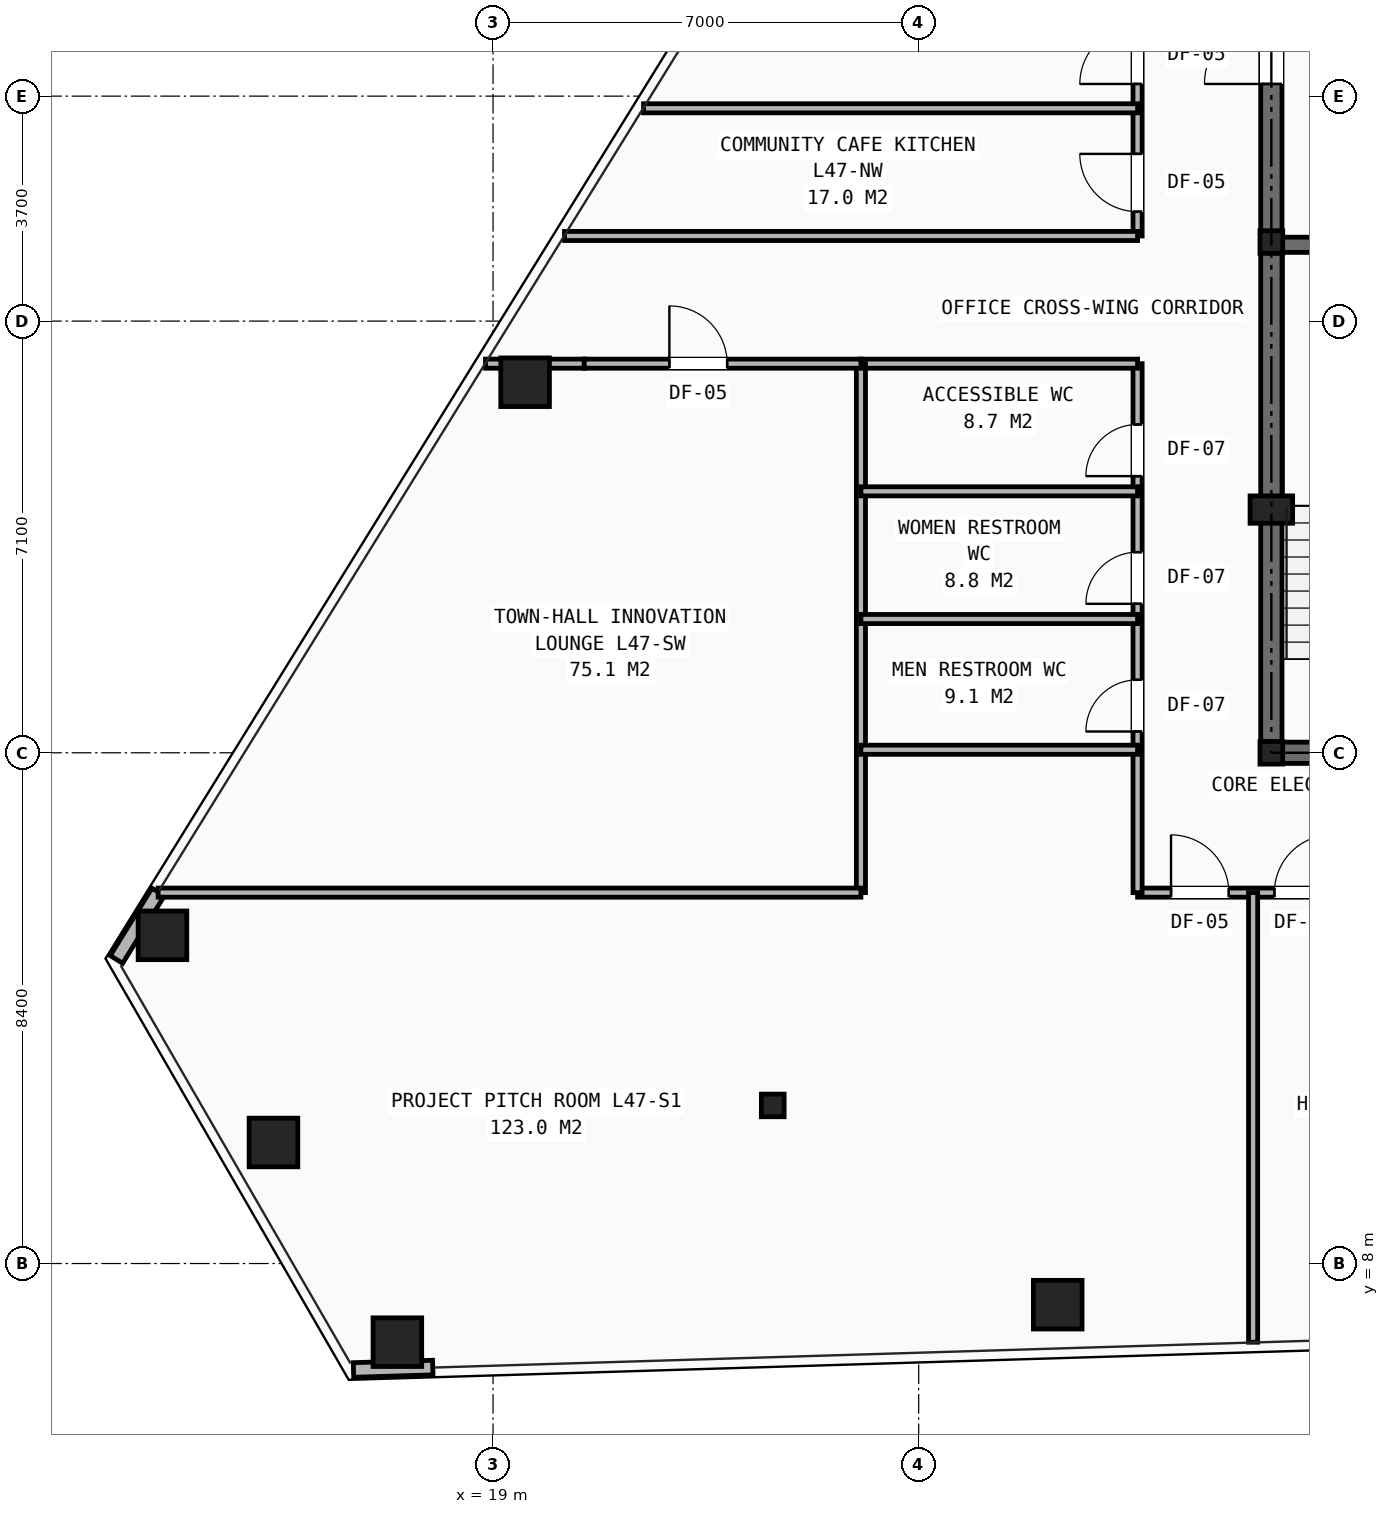
"""IFC4 building model, lengths in metres.
Left out: names, types, materials, properties, quantities, classifications, styles, units other than length and angle.
Written with IfcOpenShell. Run it as: python <this file> out.ifc"""

import sys

from ifc_helpers import new_model, si_unit, direction, frame, frame_2d, origin, origin_2d, place, context, subcontext, project, spatial, rectangle, hollow_rectangle, i_section, extrude, element, fill, save


model = new_model("IFC4")
c1 = context("Model", 3, precision=1e-05, world=origin(), true_north=direction((0.0, 1.0)))
c2 = subcontext(c1, "Body", "Model", "MODEL_VIEW")
j1 = project(units=[si_unit("LENGTHUNIT", "METRE"), si_unit("PLANEANGLEUNIT", "RADIAN")], contexts=[c1])
p1 = place(None, origin())
s1 = spatial("IfcSite", under=j1, at=p1, CompositionType="ELEMENT")
p2 = place(p1, origin())
s2 = spatial("IfcBuilding", under=s1, at=p2, CompositionType="ELEMENT")
p3 = place(p2, frame((0.0, 0.0, 165.45)))
s3 = spatial("IfcBuildingStorey", under=s2, at=p3, CompositionType="ELEMENT", Elevation=165.45)
for number, where, z_axis, x_axis in (
    (1, (31.8, 16.4, 0.0), (0.0, 0.0, 1.0), (1.0, 0.0, 0.0)),
    (2, (31.8, 24.8, 0.0), (0.0, 0.0, 1.0), (1.0, 0.0, 0.0)),
    (3, (23.6, 10.6, 0.0), (0.0, 0.0, 1.0), (1.0, 0.0, 0.0)),
):
    element("IfcColumn", number, at=place(p3, frame(where, z_axis=z_axis, x_axis=x_axis)), inside=s3, PredefinedType="COLUMN", context=c2, shape_type="SweptSolid", body=[
        extrude(i_section(OverallWidth=0.374, OverallDepth=0.372, WebThickness=0.016, FlangeThickness=0.026, at=origin_2d()), origin(), (0.0, 0.0, 1.0), 3.45),
    ])
p4 = place(p3, frame((31.8, 20.4, 0.0), z_axis=(0.0, 0.0, 1.0), x_axis=(1.0, 0.0, 0.0)))
e4 = element("IfcColumn", 4, at=p4, inside=s3, PredefinedType="PILASTER", context=c2, shape_type="SweptSolid", body=[
    extrude(rectangle(XDim=0.7, YDim=0.45, at=origin_2d()), origin(), (0.0, 0.0, 1.0), 3.45),
])
for number, where, z_axis, x_axis in (
    (5, (19.527, 22.494, 0.0), (0.0, 0.0, 1.0), (1.0, 0.0, 0.0)),
    (6, (13.564, 13.398, 0.0), (0.0, 0.0, 1.0), (1.0, 0.0, 0.0)),
    (7, (15.389, 9.991, 0.0), (0.0, 0.0, 1.0), (1.0, 0.0, 0.0)),
    (8, (17.427, 6.707, 0.0), (0.0, 0.0, 1.0), (1.0, 0.0, 0.0)),
    (9, (28.287, 7.323, 0.0), (0.0, 0.0, 1.0), (1.0, 0.0, 0.0)),
):
    element("IfcColumn", number, at=place(p3, frame(where, z_axis=z_axis, x_axis=x_axis)), inside=s3, PredefinedType="COLUMN", context=c2, shape_type="SweptSolid", body=[
        extrude(hollow_rectangle(XDim=0.8, YDim=0.8, WallThickness=0.055, at=origin_2d()), origin(), (0.0, 0.0, 1.0), 3.45),
    ])
p5 = place(p3, frame((13.493, 14.111, 0.0), z_axis=(0.0, 0.0, 1.0), x_axis=(-0.526225760999, -0.850344899709, 0.0)))
e10 = element("IfcWall", 10, at=p5, inside=s3, PredefinedType="SHEAR", context=c2, shape_type="SweptSolid", body=[
    extrude(rectangle(XDim=1.305, YDim=0.24, at=frame_2d((0.652, 0.0))), origin(), (0.0, 0.0, 1.0), 2.583),
])
p6 = place(p3, frame((16.705, 6.249, 0.0), z_axis=(0.0, 0.0, 1.0), x_axis=(0.999534631681, 0.030504427067, 0.0)))
e11 = element("IfcWall", 11, at=p6, inside=s3, PredefinedType="SHEAR", context=c2, shape_type="SweptSolid", body=[
    extrude(rectangle(XDim=1.304, YDim=0.24, at=frame_2d((0.652, 0.0))), origin(), (0.0, 0.0, 1.0), 2.583),
])
p7 = place(p3, frame((31.8, 16.4, 0.0), z_axis=(0.0, 0.0, 1.0), x_axis=(1.0, 0.0, 0.0)))
e12 = element("IfcWall", 12, at=p7, inside=s3, PredefinedType="SHEAR", context=c2, shape_type="SweptSolid", body=[
    extrude(rectangle(XDim=16.4, YDim=0.35, at=frame_2d((8.2, 0.0))), origin(), (0.0, 0.0, 1.0), 3.21),
])
p8 = place(p7, frame((4.2, 0.0, 0.0)))
e13 = element("IfcOpeningElement", 13, at=p8, cuts=e12, PredefinedType="OPENING", context=c2, shape_type="SweptSolid", body=[
    extrude(rectangle(XDim=0.95, YDim=2.1, at=frame_2d((0.475, 1.05))), frame((0.0, 0.185, 0.0), z_axis=(0.0, -1.0, 0.0), x_axis=(1.0, 0.0, 0.0)), (0.0, 0.0, 1.0), 0.37),
])
p9 = place(p7, frame((10.6, 0.0, 0.0)))
e14 = element("IfcOpeningElement", 14, at=p9, cuts=e12, PredefinedType="OPENING", context=c2, shape_type="SweptSolid", body=[
    extrude(rectangle(XDim=0.95, YDim=2.1, at=frame_2d((0.475, 1.05))), frame((0.0, 0.185, 0.0), z_axis=(0.0, -1.0, 0.0), x_axis=(1.0, 0.0, 0.0)), (0.0, 0.0, 1.0), 0.37),
])
p10 = place(p3, frame((31.8, 16.4, 0.0), z_axis=(0.0, 0.0, 1.0), x_axis=(0.0, 1.0, 0.0)))
e15 = element("IfcWall", 15, at=p10, inside=s3, PredefinedType="SHEAR", context=c2, shape_type="SweptSolid", body=[
    extrude(rectangle(XDim=14.8, YDim=0.35, at=frame_2d((7.4, 0.0))), origin(), (0.0, 0.0, 1.0), 3.21),
])
p11 = place(p10, frame((11.0, 0.0, 0.0)))
e16 = element("IfcOpeningElement", 16, at=p11, cuts=e15, PredefinedType="OPENING", context=c2, shape_type="SweptSolid", body=[
    extrude(rectangle(XDim=1.1, YDim=2.15, at=frame_2d((0.55, 1.075))), frame((0.0, 0.185, 0.0), z_axis=(0.0, -1.0, 0.0), x_axis=(1.0, 0.0, 0.0)), (0.0, 0.0, 1.0), 0.37),
])
p12 = place(p3, frame((31.8, 24.755, 0.0), z_axis=(0.0, 0.0, 1.0), x_axis=(1.0, 0.0, 0.0)))
e17 = element("IfcWall", 17, at=p12, inside=s3, PredefinedType="SHEAR", context=c2, shape_type="SweptSolid", body=[
    extrude(rectangle(XDim=3.245, YDim=0.25, at=frame_2d((1.623, 0.0))), origin(), (0.0, 0.0, 1.0), 3.21),
])
p13 = place(p3, frame((29.6, 14.1, 0.0), z_axis=(0.0, 0.0, 1.0), x_axis=(1.0, 0.0, 0.0)))
e18 = element("IfcWall", 18, at=p13, inside=s3, PredefinedType="PARTITIONING", context=c2, shape_type="SweptSolid", body=[
    extrude(rectangle(XDim=18.6, YDim=0.15, at=frame_2d((9.3, 0.0))), origin(), (0.0, 0.0, 1.0), 2.252),
])
p14 = place(p13, frame((0.55, 0.0, 0.0)))
e19 = element("IfcOpeningElement", 19, at=p14, cuts=e18, PredefinedType="OPENING", context=c2, shape_type="SweptSolid", body=[
    extrude(rectangle(XDim=0.95, YDim=2.1, at=frame_2d((0.475, 1.05))), frame((0.0, 0.085, 0.0), z_axis=(0.0, -1.0, 0.0), x_axis=(1.0, 0.0, 0.0)), (0.0, 0.0, 1.0), 0.17),
])
p15 = place(p13, frame((2.25, 0.0, 0.0)))
e20 = element("IfcOpeningElement", 20, at=p15, cuts=e18, PredefinedType="OPENING", context=c2, shape_type="SweptSolid", body=[
    extrude(rectangle(XDim=0.95, YDim=2.1, at=frame_2d((0.475, 1.05))), frame((0.0, 0.085, 0.0), z_axis=(0.0, -1.0, 0.0), x_axis=(1.0, 0.0, 0.0)), (0.0, 0.0, 1.0), 0.17),
])
p16 = place(p13, frame((6.55, 0.0, 0.0)))
e21 = element("IfcOpeningElement", 21, at=p16, cuts=e18, PredefinedType="OPENING", context=c2, shape_type="SweptSolid", body=[
    extrude(rectangle(XDim=0.95, YDim=2.1, at=frame_2d((0.475, 1.05))), frame((0.0, 0.085, 0.0), z_axis=(0.0, -1.0, 0.0), x_axis=(1.0, 0.0, 0.0)), (0.0, 0.0, 1.0), 0.17),
])
p17 = place(p13, frame((10.75, 0.0, 0.0)))
e22 = element("IfcOpeningElement", 22, at=p17, cuts=e18, PredefinedType="OPENING", context=c2, shape_type="SweptSolid", body=[
    extrude(rectangle(XDim=0.95, YDim=2.1, at=frame_2d((0.475, 1.05))), frame((0.0, 0.085, 0.0), z_axis=(0.0, -1.0, 0.0), x_axis=(1.0, 0.0, 0.0)), (0.0, 0.0, 1.0), 0.17),
])
p18 = place(p13, frame((14.95, 0.0, 0.0)))
e23 = element("IfcOpeningElement", 23, at=p18, cuts=e18, PredefinedType="OPENING", context=c2, shape_type="SweptSolid", body=[
    extrude(rectangle(XDim=0.95, YDim=2.1, at=frame_2d((0.475, 1.05))), frame((0.0, 0.085, 0.0), z_axis=(0.0, -1.0, 0.0), x_axis=(1.0, 0.0, 0.0)), (0.0, 0.0, 1.0), 0.17),
])
p19 = place(p3, frame((29.6, 14.1, 0.0), z_axis=(0.0, 0.0, 1.0), x_axis=(0.0, 1.0, 0.0)))
e24 = element("IfcWall", 24, at=p19, inside=s3, PredefinedType="PARTITIONING", context=c2, shape_type="SweptSolid", body=[
    extrude(rectangle(XDim=8.7, YDim=0.15, at=frame_2d((4.35, 0.0))), origin(), (0.0, 0.0, 1.0), 3.21),
])
p20 = place(p19, frame((2.65, 0.0, 0.0)))
e25 = element("IfcOpeningElement", 25, at=p20, cuts=e24, PredefinedType="OPENING", context=c2, shape_type="SweptSolid", body=[
    extrude(rectangle(XDim=0.85, YDim=2.05, at=frame_2d((0.425, 1.025))), frame((0.0, 0.085, 0.0), z_axis=(0.0, -1.0, 0.0), x_axis=(1.0, 0.0, 0.0)), (0.0, 0.0, 1.0), 0.17),
])
p21 = place(p19, frame((4.75, 0.0, 0.0)))
e26 = element("IfcOpeningElement", 26, at=p21, cuts=e24, PredefinedType="OPENING", context=c2, shape_type="SweptSolid", body=[
    extrude(rectangle(XDim=0.85, YDim=2.05, at=frame_2d((0.425, 1.025))), frame((0.0, 0.085, 0.0), z_axis=(0.0, -1.0, 0.0), x_axis=(1.0, 0.0, 0.0)), (0.0, 0.0, 1.0), 0.17),
])
p22 = place(p19, frame((6.85, 0.0, 0.0)))
e27 = element("IfcOpeningElement", 27, at=p22, cuts=e24, PredefinedType="OPENING", context=c2, shape_type="SweptSolid", body=[
    extrude(rectangle(XDim=0.85, YDim=2.05, at=frame_2d((0.425, 1.025))), frame((0.0, 0.085, 0.0), z_axis=(0.0, -1.0, 0.0), x_axis=(1.0, 0.0, 0.0)), (0.0, 0.0, 1.0), 0.17),
])
p23 = place(p3, frame((29.6, 24.9, 0.0), z_axis=(0.0, 0.0, 1.0), x_axis=(0.0, 1.0, 0.0)))
e28 = element("IfcWall", 28, at=p23, inside=s3, PredefinedType="PARTITIONING", context=c2, shape_type="SweptSolid", body=[
    extrude(rectangle(XDim=13.9, YDim=0.15, at=frame_2d((6.95, 0.0))), origin(), (0.0, 0.0, 1.0), 2.252),
])
p24 = place(p23, frame((0.4, 0.0, 0.0)))
e29 = element("IfcOpeningElement", 29, at=p24, cuts=e28, PredefinedType="OPENING", context=c2, shape_type="SweptSolid", body=[
    extrude(rectangle(XDim=0.95, YDim=2.1, at=frame_2d((0.475, 1.05))), frame((0.0, 0.085, 0.0), z_axis=(0.0, -1.0, 0.0), x_axis=(1.0, 0.0, 0.0)), (0.0, 0.0, 1.0), 0.17),
])
p25 = place(p23, frame((2.5, 0.0, 0.0)))
e30 = element("IfcOpeningElement", 30, at=p25, cuts=e28, PredefinedType="OPENING", context=c2, shape_type="SweptSolid", body=[
    extrude(rectangle(XDim=0.95, YDim=2.1, at=frame_2d((0.475, 1.05))), frame((0.0, 0.085, 0.0), z_axis=(0.0, -1.0, 0.0), x_axis=(1.0, 0.0, 0.0)), (0.0, 0.0, 1.0), 0.17),
])
p26 = place(p3, frame((18.876, 22.8, 0.0), z_axis=(0.0, 0.0, 1.0), x_axis=(1.0, 0.0, 0.0)))
e31 = element("IfcWall", 31, at=p26, inside=s3, PredefinedType="PARTITIONING", context=c2, shape_type="SweptSolid", body=[
    extrude(rectangle(XDim=1.624, YDim=0.15, at=frame_2d((0.812, 0.0))), origin(), (0.0, 0.0, 1.0), 2.589),
])
p27 = place(p3, frame((25.05, 22.8, 0.0), z_axis=(0.0, 0.0, 1.0), x_axis=(1.0, 0.0, 0.0)))
e32 = element("IfcWall", 32, at=p27, inside=s3, PredefinedType="PARTITIONING", context=c2, shape_type="SweptSolid", body=[
    extrude(rectangle(XDim=4.55, YDim=0.15, at=frame_2d((2.275, 0.0))), origin(), (0.0, 0.0, 1.0), 3.21),
])
p28 = place(p3, frame((20.175, 24.9, 0.0), z_axis=(0.0, 0.0, 1.0), x_axis=(1.0, 0.0, 0.0)))
e33 = element("IfcWall", 33, at=p28, inside=s3, PredefinedType="PARTITIONING", context=c2, shape_type="SweptSolid", body=[
    extrude(rectangle(XDim=9.425, YDim=0.15, at=frame_2d((4.712, 0.0))), origin(), (0.0, 0.0, 1.0), 2.589),
])
p29 = place(p3, frame((25.05, 14.1, 0.0), z_axis=(0.0, 0.0, 1.0), x_axis=(0.0, 1.0, 0.0)))
e34 = element("IfcWall", 34, at=p29, inside=s3, PredefinedType="PARTITIONING", context=c2, shape_type="SweptSolid", body=[
    extrude(rectangle(XDim=8.7, YDim=0.15, at=frame_2d((4.35, 0.0))), origin(), (0.0, 0.0, 1.0), 3.21),
])
for number, where, z_axis, x_axis in (
    (35, (25.05, 16.45, 0.0), (0.0, 0.0, 1.0), (1.0, 0.0, 0.0)),
    (36, (25.05, 18.6, 0.0), (0.0, 0.0, 1.0), (1.0, 0.0, 0.0)),
    (37, (25.05, 20.7, 0.0), (0.0, 0.0, 1.0), (1.0, 0.0, 0.0)),
):
    element("IfcWall", number, at=place(p3, frame(where, z_axis=z_axis, x_axis=x_axis)), inside=s3, PredefinedType="PARTITIONING", context=c2, shape_type="SweptSolid", body=[
        extrude(rectangle(XDim=4.55, YDim=0.15, at=frame_2d((2.275, 0.0))), origin(), (0.0, 0.0, 1.0), 3.21),
    ])
p30 = place(p3, frame((31.5, 6.706, 0.0), z_axis=(0.0, 0.0, 1.0), x_axis=(0.0, 1.0, 0.0)))
e38 = element("IfcWall", 38, at=p30, inside=s3, PredefinedType="PARTITIONING", context=c2, shape_type="SweptSolid", body=[
    extrude(rectangle(XDim=7.394, YDim=0.15, at=frame_2d((3.697, 0.0))), origin(), (0.0, 0.0, 1.0), 2.589),
])
p31 = place(p3, frame((13.492, 14.1, 0.0), z_axis=(0.0, 0.0, 1.0), x_axis=(1.0, 0.0, 0.0)))
e39 = element("IfcWall", 39, at=p31, inside=s3, PredefinedType="PARTITIONING", context=c2, shape_type="SweptSolid", body=[
    extrude(rectangle(XDim=11.558, YDim=0.15, at=frame_2d((5.779, 0.0))), origin(), (0.0, 0.0, 1.0), 2.589),
])
p32 = place(p3, frame((20.5, 22.8, 0.0), z_axis=(0.0, 0.0, 1.0), x_axis=(1.0, 0.0, 0.0)))
e40 = element("IfcWall", 40, at=p32, inside=s3, PredefinedType="PARTITIONING", context=c2, shape_type="SweptSolid", body=[
    extrude(rectangle(XDim=4.55, YDim=0.15, at=frame_2d((2.275, 0.0))), origin(), (0.0, 0.0, 1.0), 3.21),
])
p33 = place(p32, frame((1.4, 0.0, 0.0)))
e41 = element("IfcOpeningElement", 41, at=p33, cuts=e40, PredefinedType="OPENING", context=c2, shape_type="SweptSolid", body=[
    extrude(rectangle(XDim=0.95, YDim=2.1, at=frame_2d((0.475, 1.05))), frame((0.0, 0.085, 0.0), z_axis=(0.0, -1.0, 0.0), x_axis=(1.0, 0.0, 0.0)), (0.0, 0.0, 1.0), 0.17),
])
p34 = place(p3, frame((21.475, 27.0, 0.0), z_axis=(0.0, 0.0, 1.0), x_axis=(1.0, 0.0, 0.0)))
e42 = element("IfcWall", 42, at=p34, inside=s3, PredefinedType="PARTITIONING", context=c2, shape_type="SweptSolid", body=[
    extrude(rectangle(XDim=8.125, YDim=0.15, at=frame_2d((4.063, 0.0))), origin(), (0.0, 0.0, 1.0), 2.589),
])
p35 = place(p11, origin())
e43 = element("IfcDoor", 43, at=p35, inside=s3, OperationType="SINGLE_SWING_LEFT", PredefinedType="DOOR", context=c2, shape_type="SweptSolid", body=[
    extrude(rectangle(XDim=1.1, YDim=2.15, at=frame_2d((0.55, 1.075))), frame((0.0, 0.025, 0.0), z_axis=(0.0, -1.0, 0.0), x_axis=(1.0, 0.0, 0.0)), (0.0, 0.0, 1.0), 0.05),
])
fill(e16, e43)
p36 = place(p20, origin())
e44 = element("IfcDoor", 44, at=p36, inside=s3, OperationType="SINGLE_SWING_LEFT", PredefinedType="DOOR", context=c2, shape_type="SweptSolid", body=[
    extrude(rectangle(XDim=0.85, YDim=2.05, at=frame_2d((0.425, 1.025))), frame((0.0, 0.025, 0.0), z_axis=(0.0, -1.0, 0.0), x_axis=(1.0, 0.0, 0.0)), (0.0, 0.0, 1.0), 0.05),
])
fill(e25, e44)
p37 = place(p21, origin())
e45 = element("IfcDoor", 45, at=p37, inside=s3, OperationType="SINGLE_SWING_LEFT", PredefinedType="DOOR", context=c2, shape_type="SweptSolid", body=[
    extrude(rectangle(XDim=0.85, YDim=2.05, at=frame_2d((0.425, 1.025))), frame((0.0, 0.025, 0.0), z_axis=(0.0, -1.0, 0.0), x_axis=(1.0, 0.0, 0.0)), (0.0, 0.0, 1.0), 0.05),
])
fill(e26, e45)
p38 = place(p22, origin())
e46 = element("IfcDoor", 46, at=p38, inside=s3, OperationType="SINGLE_SWING_LEFT", PredefinedType="DOOR", context=c2, shape_type="SweptSolid", body=[
    extrude(rectangle(XDim=0.85, YDim=2.05, at=frame_2d((0.425, 1.025))), frame((0.0, 0.025, 0.0), z_axis=(0.0, -1.0, 0.0), x_axis=(1.0, 0.0, 0.0)), (0.0, 0.0, 1.0), 0.05),
])
fill(e27, e46)
p39 = place(p14, origin())
e47 = element("IfcDoor", 47, at=p39, inside=s3, OperationType="SINGLE_SWING_LEFT", PredefinedType="DOOR", context=c2, shape_type="SweptSolid", body=[
    extrude(rectangle(XDim=0.95, YDim=2.1, at=frame_2d((0.475, 1.05))), frame((0.0, 0.025, 0.0), z_axis=(0.0, -1.0, 0.0), x_axis=(1.0, 0.0, 0.0)), (0.0, 0.0, 1.0), 0.05),
])
fill(e19, e47)
p40 = place(p15, origin())
e48 = element("IfcDoor", 48, at=p40, inside=s3, OperationType="SINGLE_SWING_RIGHT", PredefinedType="DOOR", context=c2, shape_type="SweptSolid", body=[
    extrude(rectangle(XDim=0.95, YDim=2.1, at=frame_2d((0.475, 1.05))), frame((0.0, 0.025, 0.0), z_axis=(0.0, -1.0, 0.0), x_axis=(1.0, 0.0, 0.0)), (0.0, 0.0, 1.0), 0.05),
])
fill(e20, e48)
p41 = place(p33, origin())
e49 = element("IfcDoor", 49, at=p41, inside=s3, OperationType="SINGLE_SWING_LEFT", PredefinedType="DOOR", context=c2, shape_type="SweptSolid", body=[
    extrude(rectangle(XDim=0.95, YDim=2.1, at=frame_2d((0.475, 1.05))), frame((0.0, 0.025, 0.0), z_axis=(0.0, -1.0, 0.0), x_axis=(1.0, 0.0, 0.0)), (0.0, 0.0, 1.0), 0.05),
])
fill(e41, e49)
p42 = place(p24, origin())
e50 = element("IfcDoor", 50, at=p42, inside=s3, OperationType="SINGLE_SWING_RIGHT", PredefinedType="DOOR", context=c2, shape_type="SweptSolid", body=[
    extrude(rectangle(XDim=0.95, YDim=2.1, at=frame_2d((0.475, 1.05))), frame((0.0, 0.025, 0.0), z_axis=(0.0, -1.0, 0.0), x_axis=(1.0, 0.0, 0.0)), (0.0, 0.0, 1.0), 0.05),
])
fill(e29, e50)
p43 = place(p25, origin())
e51 = element("IfcDoor", 51, at=p43, inside=s3, OperationType="SINGLE_SWING_LEFT", PredefinedType="DOOR", context=c2, shape_type="SweptSolid", body=[
    extrude(rectangle(XDim=0.95, YDim=2.1, at=frame_2d((0.475, 1.05))), frame((0.0, 0.025, 0.0), z_axis=(0.0, -1.0, 0.0), x_axis=(1.0, 0.0, 0.0)), (0.0, 0.0, 1.0), 0.05),
])
fill(e30, e51)
save(model, sys.argv[1])
